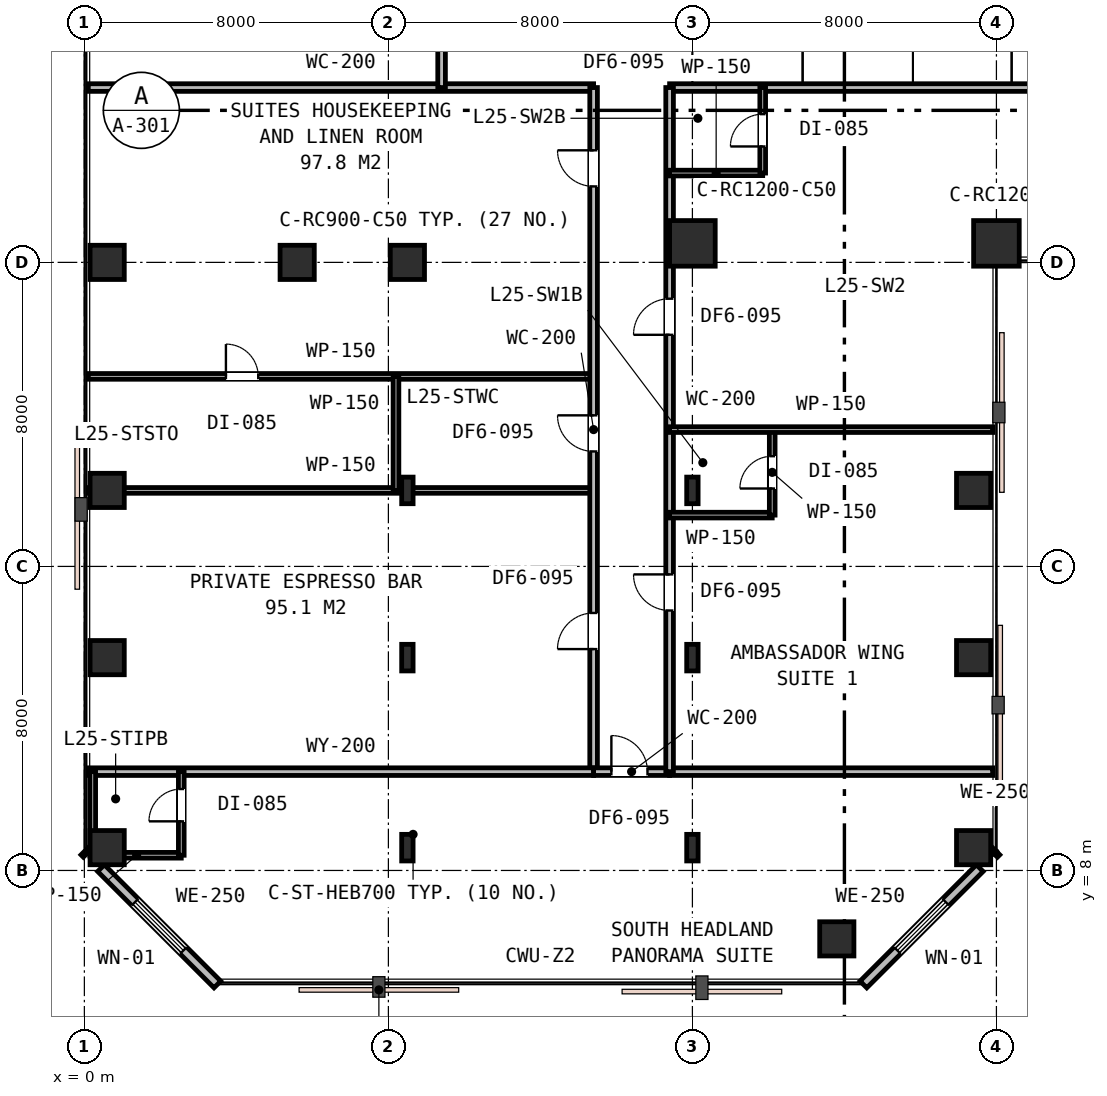
"""IFC4 building model, lengths in metres.
Left out: names, types, materials, properties, quantities, classifications, styles, units other than length and angle.
Written with IfcOpenShell. Run it as: python <this file> out.ifc"""

import sys

from ifc_helpers import new_model, si_unit, direction, frame, frame_2d, origin, origin_2d, place, context, subcontext, project, spatial, rectangle, i_section, extrude, element, fill, save


model = new_model("IFC4")
c1 = context("Model", 3, precision=1e-05, world=origin(), true_north=direction((0.0, 1.0)))
c2 = subcontext(c1, "Body", "Model", "MODEL_VIEW")
j1 = project(units=[si_unit("LENGTHUNIT", "METRE"), si_unit("PLANEANGLEUNIT", "RADIAN")], contexts=[c1])
p1 = place(None, origin())
s1 = spatial("IfcSite", under=j1, at=p1, CompositionType="ELEMENT")
p2 = place(p1, origin())
s2 = spatial("IfcBuilding", under=s1, at=p2, CompositionType="ELEMENT")
p3 = place(p2, frame((0.0, 0.0, 100.8)))
s3 = spatial("IfcBuildingStorey", under=s2, at=p3, CompositionType="ELEMENT", Elevation=100.8)
p4 = place(p3, frame((8.5, 24.0, 0.0), z_axis=(0.0, 0.0, 1.0), x_axis=(1.0, 0.0, 0.0)))
e1 = element("IfcColumn", 1, at=p4, inside=s3, PredefinedType="COLUMN", context=c2, shape_type="SweptSolid", body=[
    extrude(rectangle(XDim=0.9, YDim=0.9, at=origin_2d()), origin(), (0.0, 0.0, 1.0), 3.6),
])
for number, where, z_axis, x_axis in (
    (2, (16.0, 24.5, 0.0), (0.0, 0.0, 1.0), (1.0, 0.0, 0.0)),
    (3, (24.0, 24.5, 0.0), (0.0, 0.0, 1.0), (1.0, 0.0, 0.0)),
):
    element("IfcColumn", number, at=place(p3, frame(where, z_axis=z_axis, x_axis=x_axis)), inside=s3, PredefinedType="COLUMN", context=c2, shape_type="SweptSolid", body=[
        extrude(rectangle(XDim=1.2, YDim=1.2, at=origin_2d()), origin(), (0.0, 0.0, 1.0), 3.6),
    ])
for number, where, z_axis, x_axis in (
    (4, (5.6, 24.0, 0.0), (0.0, 0.0, 1.0), (1.0, 0.0, 0.0)),
    (5, (0.6, 24.0, 0.0), (0.0, 0.0, 1.0), (1.0, 0.0, 0.0)),
    (6, (0.6, 8.6, 0.0), (0.0, 0.0, 1.0), (1.0, 0.0, 0.0)),
    (7, (0.6, 13.6, 0.0), (0.0, 0.0, 1.0), (1.0, 0.0, 0.0)),
    (8, (0.6, 18.0, 0.0), (0.0, 0.0, 1.0), (1.0, 0.0, 0.0)),
    (9, (19.8, 6.2, 0.0), (0.0, 0.0, 1.0), (1.0, 0.0, 0.0)),
    (10, (23.4, 8.6, 0.0), (0.0, 0.0, 1.0), (1.0, 0.0, 0.0)),
    (11, (23.4, 13.6, 0.0), (0.0, 0.0, 1.0), (1.0, 0.0, 0.0)),
    (12, (23.4, 18.0, 0.0), (0.0, 0.0, 1.0), (1.0, 0.0, 0.0)),
):
    element("IfcColumn", number, at=place(p3, frame(where, z_axis=z_axis, x_axis=x_axis)), inside=s3, PredefinedType="COLUMN", context=c2, shape_type="SweptSolid", body=[
        extrude(rectangle(XDim=0.9, YDim=0.9, at=origin_2d()), origin(), (0.0, 0.0, 1.0), 3.6),
    ])
for number, where, z_axis, x_axis in (
    (13, (8.5, 8.6, 0.0), (0.0, 0.0, 1.0), (1.0, 0.0, 0.0)),
    (14, (16.0, 8.6, 0.0), (0.0, 0.0, 1.0), (1.0, 0.0, 0.0)),
    (15, (8.5, 13.6, 0.0), (0.0, 0.0, 1.0), (1.0, 0.0, 0.0)),
    (16, (16.0, 13.6, 0.0), (0.0, 0.0, 1.0), (1.0, 0.0, 0.0)),
    (17, (8.5, 18.0, 0.0), (0.0, 0.0, 1.0), (1.0, 0.0, 0.0)),
    (18, (16.0, 18.0, 0.0), (0.0, 0.0, 1.0), (1.0, 0.0, 0.0)),
):
    element("IfcColumn", number, at=place(p3, frame(where, z_axis=z_axis, x_axis=x_axis)), inside=s3, PredefinedType="COLUMN", context=c2, shape_type="SweptSolid", body=[
        extrude(i_section(OverallWidth=0.3, OverallDepth=0.7, WebThickness=0.017, FlangeThickness=0.032, FilletRadius=0.027, at=origin_2d()), origin(), (0.0, 0.0, 1.0), 3.6),
    ])
p5 = place(p3, frame((20.5, 5.0, 0.0), z_axis=(0.0, 0.0, 1.0), x_axis=(0.707106781187, 0.707106781187, 0.0)))
e19 = element("IfcWall", 19, at=p5, inside=s3, PredefinedType="STANDARD", context=c2, shape_type="SweptSolid", body=[
    extrude(rectangle(XDim=4.33, YDim=0.25, at=frame_2d((2.165, 0.0))), origin(), (0.0, 0.0, 1.0), 3.33),
])
p6 = place(p5, frame((1.265, 0.0, 0.75)))
e20 = element("IfcOpeningElement", 20, at=p6, cuts=e19, PredefinedType="OPENING", context=c2, shape_type="SweptSolid", body=[
    extrude(rectangle(XDim=1.8, YDim=1.85, at=frame_2d((0.9, 0.925))), frame((0.0, 0.135, 0.0), z_axis=(0.0, -1.0, 0.0), x_axis=(1.0, 0.0, 0.0)), (0.0, 0.0, 1.0), 0.27),
])
for number, where, z_axis, x_axis in (
    (21, (23.938, 8.438, 0.0), (0.0, 0.0, 1.0), (0.707, 0.707, 0.0)),
    (22, (0.0, 8.5, 0.0), (0.0, 0.0, 1.0), (0.707, -0.707, 0.0)),
):
    element("IfcWall", number, at=place(p3, frame(where, z_axis=z_axis, x_axis=x_axis)), inside=s3, PredefinedType="STANDARD", context=c2, shape_type="SweptSolid", body=[
        extrude(rectangle(XDim=0.087, YDim=0.25, at=frame_2d((0.044, 0.0))), origin(), (0.0, 0.0, 1.0), 3.33),
    ])
p7 = place(p3, frame((0.438, 8.062, 0.0), z_axis=(0.0, 0.0, 1.0), x_axis=(0.707106781187, -0.707106781187, 0.0)))
e23 = element("IfcWall", 23, at=p7, inside=s3, PredefinedType="STANDARD", context=c2, shape_type="SweptSolid", body=[
    extrude(rectangle(XDim=4.33, YDim=0.25, at=frame_2d((2.165, 0.0))), origin(), (0.0, 0.0, 1.0), 3.33),
])
p8 = place(p7, frame((1.265, 0.0, 0.75)))
e24 = element("IfcOpeningElement", 24, at=p8, cuts=e23, PredefinedType="OPENING", context=c2, shape_type="SweptSolid", body=[
    extrude(rectangle(XDim=1.8, YDim=1.85, at=frame_2d((0.9, 0.925))), frame((0.0, 0.135, 0.0), z_axis=(0.0, -1.0, 0.0), x_axis=(1.0, 0.0, 0.0)), (0.0, 0.0, 1.0), 0.27),
])
p9 = place(p3, frame((0.1, 28.6, 0.0), z_axis=(0.0, 0.0, 1.0), x_axis=(1.0, 0.0, 0.0)))
e25 = element("IfcWall", 25, at=p9, inside=s3, PredefinedType="PARTITIONING", context=c2, shape_type="SweptSolid", body=[
    extrude(rectangle(XDim=13.3, YDim=0.2, at=frame_2d((6.65, 0.0))), origin(), (0.0, 0.0, 1.0), 2.87),
])
p10 = place(p3, frame((15.4, 28.6, 0.0), z_axis=(0.0, 0.0, 1.0), x_axis=(1.0, 0.0, 0.0)))
e26 = element("IfcWall", 26, at=p10, inside=s3, PredefinedType="PARTITIONING", context=c2, shape_type="SweptSolid", body=[
    extrude(rectangle(XDim=28.8, YDim=0.2, at=frame_2d((14.4, 0.0))), origin(), (0.0, 0.0, 1.0), 2.87),
])
p11 = place(p10, frame((12.41, 0.0, 0.0)))
e27 = element("IfcOpeningElement", 27, at=p11, cuts=e26, PredefinedType="OPENING", context=c2, shape_type="SweptSolid", body=[
    extrude(rectangle(XDim=0.95, YDim=2.15, at=frame_2d((0.475, 1.075))), frame((0.0, 0.11, 0.0), z_axis=(0.0, -1.0, 0.0), x_axis=(1.0, 0.0, 0.0)), (0.0, 0.0, 1.0), 0.22),
])
p12 = place(p10, frame((22.68, 0.0, 0.0)))
e28 = element("IfcOpeningElement", 28, at=p12, cuts=e26, PredefinedType="OPENING", context=c2, shape_type="SweptSolid", body=[
    extrude(rectangle(XDim=0.95, YDim=2.15, at=frame_2d((0.475, 1.075))), frame((0.0, 0.11, 0.0), z_axis=(0.0, -1.0, 0.0), x_axis=(1.0, 0.0, 0.0)), (0.0, 0.0, 1.0), 0.22),
])
p13 = place(p3, frame((0.1, 18.0, 0.0), z_axis=(0.0, 0.0, 1.0), x_axis=(1.0, 0.0, 0.0)))
e29 = element("IfcWall", 29, at=p13, inside=s3, PredefinedType="PARTITIONING", context=c2, shape_type="SweptSolid", body=[
    extrude(rectangle(XDim=13.3, YDim=0.15, at=frame_2d((6.65, 0.0))), origin(), (0.0, 0.0, 1.0), 2.87),
])
p14 = place(p3, frame((0.1, 21.0, 0.0), z_axis=(0.0, 0.0, 1.0), x_axis=(1.0, 0.0, 0.0)))
e30 = element("IfcWall", 30, at=p14, inside=s3, PredefinedType="PARTITIONING", context=c2, shape_type="SweptSolid", body=[
    extrude(rectangle(XDim=13.3, YDim=0.15, at=frame_2d((6.65, 0.0))), origin(), (0.0, 0.0, 1.0), 2.87),
])
p15 = place(p14, frame((3.625, 0.0, 0.0)))
e31 = element("IfcOpeningElement", 31, at=p15, cuts=e30, PredefinedType="OPENING", context=c2, shape_type="SweptSolid", body=[
    extrude(rectangle(XDim=0.85, YDim=2.15, at=frame_2d((0.425, 1.075))), frame((0.0, 0.085, 0.0), z_axis=(0.0, -1.0, 0.0), x_axis=(1.0, 0.0, 0.0)), (0.0, 0.0, 1.0), 0.17),
])
p16 = place(p3, frame((8.2, 18.0, 0.0), z_axis=(0.0, 0.0, 1.0), x_axis=(0.0, 1.0, 0.0)))
e32 = element("IfcWall", 32, at=p16, inside=s3, PredefinedType="PARTITIONING", context=c2, shape_type="SweptSolid", body=[
    extrude(rectangle(XDim=3.0, YDim=0.15, at=frame_2d((1.5, 0.0))), origin(), (0.0, 0.0, 1.0), 2.87),
])
p17 = place(p3, frame((13.4, 10.6, 0.0), z_axis=(0.0, 0.0, 1.0), x_axis=(0.0, 1.0, 0.0)))
e33 = element("IfcWall", 33, at=p17, inside=s3, PredefinedType="PARTITIONING", context=c2, shape_type="SweptSolid", body=[
    extrude(rectangle(XDim=18.0, YDim=0.2, at=frame_2d((9.0, 0.0))), origin(), (0.0, 0.0, 1.0), 2.87),
])
p18 = place(p17, frame((8.425, 0.0, 0.0)))
e34 = element("IfcOpeningElement", 34, at=p18, cuts=e33, PredefinedType="OPENING", context=c2, shape_type="SweptSolid", body=[
    extrude(rectangle(XDim=0.95, YDim=2.15, at=frame_2d((0.475, 1.075))), frame((0.0, 0.11, 0.0), z_axis=(0.0, -1.0, 0.0), x_axis=(1.0, 0.0, 0.0)), (0.0, 0.0, 1.0), 0.22),
])
p19 = place(p17, frame((15.399, 0.0, 0.0)))
e35 = element("IfcOpeningElement", 35, at=p19, cuts=e33, PredefinedType="OPENING", context=c2, shape_type="SweptSolid", body=[
    extrude(rectangle(XDim=0.95, YDim=2.15, at=frame_2d((0.475, 1.075))), frame((0.0, 0.11, 0.0), z_axis=(0.0, -1.0, 0.0), x_axis=(1.0, 0.0, 0.0)), (0.0, 0.0, 1.0), 0.22),
])
p20 = place(p17, frame((3.225, 0.0, 0.0)))
e36 = element("IfcOpeningElement", 36, at=p20, cuts=e33, PredefinedType="OPENING", context=c2, shape_type="SweptSolid", body=[
    extrude(rectangle(XDim=0.95, YDim=2.15, at=frame_2d((0.475, 1.075))), frame((0.0, 0.11, 0.0), z_axis=(0.0, -1.0, 0.0), x_axis=(1.0, 0.0, 0.0)), (0.0, 0.0, 1.0), 0.22),
])
p21 = place(p3, frame((9.4, 28.6, 0.0), z_axis=(0.0, 0.0, 1.0), x_axis=(0.0, 1.0, 0.0)))
e37 = element("IfcWall", 37, at=p21, inside=s3, PredefinedType="PARTITIONING", context=c2, shape_type="SweptSolid", body=[
    extrude(rectangle(XDim=12.9, YDim=0.2, at=frame_2d((6.45, 0.0))), origin(), (0.0, 0.0, 1.0), 2.87),
])
p22 = place(p21, frame((3.825, 0.0, 0.0)))
e38 = element("IfcOpeningElement", 38, at=p22, cuts=e37, PredefinedType="OPENING", context=c2, shape_type="SweptSolid", body=[
    extrude(rectangle(XDim=0.95, YDim=2.15, at=frame_2d((0.475, 1.075))), frame((0.0, 0.11, 0.0), z_axis=(0.0, -1.0, 0.0), x_axis=(1.0, 0.0, 0.0)), (0.0, 0.0, 1.0), 0.22),
])
p23 = place(p21, frame((9.175, 0.0, 0.0)))
e39 = element("IfcOpeningElement", 39, at=p23, cuts=e37, PredefinedType="OPENING", context=c2, shape_type="SweptSolid", body=[
    extrude(rectangle(XDim=0.95, YDim=2.15, at=frame_2d((0.475, 1.075))), frame((0.0, 0.11, 0.0), z_axis=(0.0, -1.0, 0.0), x_axis=(1.0, 0.0, 0.0)), (0.0, 0.0, 1.0), 0.22),
])
p24 = place(p3, frame((0.1, 10.6, 0.0), z_axis=(0.0, 0.0, 1.0), x_axis=(1.0, 0.0, 0.0)))
e40 = element("IfcWall", 40, at=p24, inside=s3, PredefinedType="PARTITIONING", context=c2, shape_type="SweptSolid", body=[
    extrude(rectangle(XDim=13.3, YDim=0.2, at=frame_2d((6.65, 0.0))), origin(), (0.0, 0.0, 1.0), 2.87),
])
p25 = place(p3, frame((15.4, 10.6, 0.0), z_axis=(0.0, 0.0, 1.0), x_axis=(1.0, 0.0, 0.0)))
e41 = element("IfcWall", 41, at=p25, inside=s3, PredefinedType="PARTITIONING", context=c2, shape_type="SweptSolid", body=[
    extrude(rectangle(XDim=8.5, YDim=0.2, at=frame_2d((4.25, 0.0))), origin(), (0.0, 0.0, 1.0), 2.87),
])
p26 = place(p3, frame((13.4, 10.6, 0.0), z_axis=(0.0, 0.0, 1.0), x_axis=(1.0, 0.0, 0.0)))
e42 = element("IfcWall", 42, at=p26, inside=s3, PredefinedType="PARTITIONING", context=c2, shape_type="SweptSolid", body=[
    extrude(rectangle(XDim=2.0, YDim=0.2, at=frame_2d((1.0, 0.0))), origin(), (0.0, 0.0, 1.0), 3.01),
])
p27 = place(p26, frame((0.468, 0.0, 0.0)))
e43 = element("IfcOpeningElement", 43, at=p27, cuts=e42, PredefinedType="OPENING", context=c2, shape_type="SweptSolid", body=[
    extrude(rectangle(XDim=0.95, YDim=2.15, at=frame_2d((0.475, 1.075))), frame((0.0, 0.11, 0.0), z_axis=(0.0, -1.0, 0.0), x_axis=(1.0, 0.0, 0.0)), (0.0, 0.0, 1.0), 0.22),
])
p28 = place(p3, frame((0.2, 8.4, 0.0), z_axis=(0.0, 0.0, 1.0), x_axis=(1.0, 0.0, 0.0)))
e44 = element("IfcWall", 44, at=p28, inside=s3, PredefinedType="PARTITIONING", context=c2, shape_type="SweptSolid", body=[
    extrude(rectangle(XDim=2.35, YDim=0.15, at=frame_2d((1.175, 0.0))), origin(), (0.0, 0.0, 1.0), 2.87),
])
p29 = place(p3, frame((2.55, 8.4, 0.0), z_axis=(0.0, 0.0, 1.0), x_axis=(0.0, 1.0, 0.0)))
e45 = element("IfcWall", 45, at=p29, inside=s3, PredefinedType="PARTITIONING", context=c2, shape_type="SweptSolid", body=[
    extrude(rectangle(XDim=2.2, YDim=0.15, at=frame_2d((1.1, 0.0))), origin(), (0.0, 0.0, 1.0), 2.87),
])
p30 = place(p29, frame((0.892, 0.0, 0.0)))
e46 = element("IfcOpeningElement", 46, at=p30, cuts=e45, PredefinedType="OPENING", context=c2, shape_type="SweptSolid", body=[
    extrude(rectangle(XDim=0.85, YDim=2.15, at=frame_2d((0.425, 1.075))), frame((0.0, 0.085, 0.0), z_axis=(0.0, -1.0, 0.0), x_axis=(1.0, 0.0, 0.0)), (0.0, 0.0, 1.0), 0.17),
])
p31 = place(p3, frame((0.22, 8.38, 0.0), z_axis=(0.0, 0.0, 1.0), x_axis=(0.0, 1.0, 0.0)))
e47 = element("IfcWall", 47, at=p31, inside=s3, PredefinedType="PARTITIONING", context=c2, shape_type="SweptSolid", body=[
    extrude(rectangle(XDim=2.22, YDim=0.15, at=frame_2d((1.11, 0.0))), origin(), (0.0, 0.0, 1.0), 2.87),
])
p32 = place(p3, frame((15.4, 10.6, 0.0), z_axis=(0.0, 0.0, 1.0), x_axis=(0.0, 1.0, 0.0)))
e48 = element("IfcWall", 48, at=p32, inside=s3, PredefinedType="PARTITIONING", context=c2, shape_type="SweptSolid", body=[
    extrude(rectangle(XDim=18.0, YDim=0.2, at=frame_2d((9.0, 0.0))), origin(), (0.0, 0.0, 1.0), 2.87),
])
p33 = place(p32, frame((4.24, 0.0, 0.0)))
e49 = element("IfcOpeningElement", 49, at=p33, cuts=e48, PredefinedType="OPENING", context=c2, shape_type="SweptSolid", body=[
    extrude(rectangle(XDim=0.95, YDim=2.15, at=frame_2d((0.475, 1.075))), frame((0.0, 0.11, 0.0), z_axis=(0.0, -1.0, 0.0), x_axis=(1.0, 0.0, 0.0)), (0.0, 0.0, 1.0), 0.22),
])
p34 = place(p32, frame((11.494, 0.0, 0.0)))
e50 = element("IfcOpeningElement", 50, at=p34, cuts=e48, PredefinedType="OPENING", context=c2, shape_type="SweptSolid", body=[
    extrude(rectangle(XDim=0.95, YDim=2.15, at=frame_2d((0.475, 1.075))), frame((0.0, 0.11, 0.0), z_axis=(0.0, -1.0, 0.0), x_axis=(1.0, 0.0, 0.0)), (0.0, 0.0, 1.0), 0.22),
])
p35 = place(p3, frame((15.4, 17.35, 0.0), z_axis=(0.0, 0.0, 1.0), x_axis=(1.0, 0.0, 0.0)))
e51 = element("IfcWall", 51, at=p35, inside=s3, PredefinedType="PARTITIONING", context=c2, shape_type="SweptSolid", body=[
    extrude(rectangle(XDim=2.7, YDim=0.15, at=frame_2d((1.35, 0.0))), origin(), (0.0, 0.0, 1.0), 2.87),
])
p36 = place(p3, frame((18.1, 17.35, 0.0), z_axis=(0.0, 0.0, 1.0), x_axis=(0.0, 1.0, 0.0)))
e52 = element("IfcWall", 52, at=p36, inside=s3, PredefinedType="PARTITIONING", context=c2, shape_type="SweptSolid", body=[
    extrude(rectangle(XDim=2.25, YDim=0.15, at=frame_2d((1.125, 0.0))), origin(), (0.0, 0.0, 1.0), 2.87),
])
p37 = place(p36, frame((0.7, 0.0, 0.0)))
e53 = element("IfcOpeningElement", 53, at=p37, cuts=e52, PredefinedType="OPENING", context=c2, shape_type="SweptSolid", body=[
    extrude(rectangle(XDim=0.85, YDim=2.15, at=frame_2d((0.425, 1.075))), frame((0.0, 0.085, 0.0), z_axis=(0.0, -1.0, 0.0), x_axis=(1.0, 0.0, 0.0)), (0.0, 0.0, 1.0), 0.17),
])
p38 = place(p3, frame((15.4, 19.6, 0.0), z_axis=(0.0, 0.0, 1.0), x_axis=(1.0, 0.0, 0.0)))
e54 = element("IfcWall", 54, at=p38, inside=s3, PredefinedType="PARTITIONING", context=c2, shape_type="SweptSolid", body=[
    extrude(rectangle(XDim=8.5, YDim=0.15, at=frame_2d((4.25, 0.0))), origin(), (0.0, 0.0, 1.0), 2.87),
])
p39 = place(p3, frame((15.4, 26.35, 0.0), z_axis=(0.0, 0.0, 1.0), x_axis=(1.0, 0.0, 0.0)))
e55 = element("IfcWall", 55, at=p39, inside=s3, PredefinedType="PARTITIONING", context=c2, shape_type="SweptSolid", body=[
    extrude(rectangle(XDim=2.45, YDim=0.15, at=frame_2d((1.225, 0.0))), origin(), (0.0, 0.0, 1.0), 2.87),
])
p40 = place(p3, frame((17.85, 26.35, 0.0), z_axis=(0.0, 0.0, 1.0), x_axis=(0.0, 1.0, 0.0)))
e56 = element("IfcWall", 56, at=p40, inside=s3, PredefinedType="PARTITIONING", context=c2, shape_type="SweptSolid", body=[
    extrude(rectangle(XDim=2.25, YDim=0.15, at=frame_2d((1.125, 0.0))), origin(), (0.0, 0.0, 1.0), 3.33),
])
p41 = place(p40, frame((0.7, 0.0, 0.0)))
e57 = element("IfcOpeningElement", 57, at=p41, cuts=e56, PredefinedType="OPENING", context=c2, shape_type="SweptSolid", body=[
    extrude(rectangle(XDim=0.85, YDim=2.15, at=frame_2d((0.425, 1.075))), frame((0.0, 0.085, 0.0), z_axis=(0.0, -1.0, 0.0), x_axis=(1.0, 0.0, 0.0)), (0.0, 0.0, 1.0), 0.17),
])
p42 = place(p6, origin())
e58 = element("IfcWindow", 58, at=p42, inside=s3, PartitioningType="SINGLE_PANEL", PredefinedType="WINDOW", context=c2, shape_type="SweptSolid", body=[
    extrude(rectangle(XDim=1.8, YDim=1.85, at=frame_2d((0.9, 0.925))), frame((0.0, 0.03, 0.0), z_axis=(0.0, -1.0, 0.0), x_axis=(1.0, 0.0, 0.0)), (0.0, 0.0, 1.0), 0.06),
])
fill(e20, e58)
p43 = place(p8, origin())
e59 = element("IfcWindow", 59, at=p43, inside=s3, PartitioningType="SINGLE_PANEL", PredefinedType="WINDOW", context=c2, shape_type="SweptSolid", body=[
    extrude(rectangle(XDim=1.8, YDim=1.85, at=frame_2d((0.9, 0.925))), frame((0.0, 0.03, 0.0), z_axis=(0.0, -1.0, 0.0), x_axis=(1.0, 0.0, 0.0)), (0.0, 0.0, 1.0), 0.06),
])
fill(e24, e59)
p44 = place(p18, origin())
e60 = element("IfcDoor", 60, at=p44, inside=s3, OperationType="SINGLE_SWING_RIGHT", PredefinedType="DOOR", context=c2, shape_type="SweptSolid", body=[
    extrude(rectangle(XDim=0.95, YDim=2.15, at=frame_2d((0.475, 1.075))), frame((0.0, 0.025, 0.0), z_axis=(0.0, -1.0, 0.0), x_axis=(1.0, 0.0, 0.0)), (0.0, 0.0, 1.0), 0.05),
])
fill(e34, e60)
p45 = place(p15, origin())
e61 = element("IfcDoor", 61, at=p45, inside=s3, OperationType="SINGLE_SWING_LEFT", PredefinedType="DOOR", context=c2, shape_type="SweptSolid", body=[
    extrude(rectangle(XDim=0.85, YDim=2.15, at=frame_2d((0.425, 1.075))), frame((0.0, 0.025, 0.0), z_axis=(0.0, -1.0, 0.0), x_axis=(1.0, 0.0, 0.0)), (0.0, 0.0, 1.0), 0.05),
])
fill(e31, e61)
p46 = place(p19, origin())
e62 = element("IfcDoor", 62, at=p46, inside=s3, OperationType="SINGLE_SWING_RIGHT", PredefinedType="DOOR", context=c2, shape_type="SweptSolid", body=[
    extrude(rectangle(XDim=0.95, YDim=2.15, at=frame_2d((0.475, 1.075))), frame((0.0, 0.025, 0.0), z_axis=(0.0, -1.0, 0.0), x_axis=(1.0, 0.0, 0.0)), (0.0, 0.0, 1.0), 0.05),
])
fill(e35, e62)
p47 = place(p20, origin())
e63 = element("IfcDoor", 63, at=p47, inside=s3, OperationType="SINGLE_SWING_LEFT", PredefinedType="DOOR", context=c2, shape_type="SweptSolid", body=[
    extrude(rectangle(XDim=0.95, YDim=2.15, at=frame_2d((0.475, 1.075))), frame((0.0, 0.025, 0.0), z_axis=(0.0, -1.0, 0.0), x_axis=(1.0, 0.0, 0.0)), (0.0, 0.0, 1.0), 0.05),
])
fill(e36, e63)
p48 = place(p27, origin())
e64 = element("IfcDoor", 64, at=p48, inside=s3, OperationType="SINGLE_SWING_LEFT", PredefinedType="DOOR", context=c2, shape_type="SweptSolid", body=[
    extrude(rectangle(XDim=0.95, YDim=2.15, at=frame_2d((0.475, 1.075))), frame((0.0, 0.025, 0.0), z_axis=(0.0, -1.0, 0.0), x_axis=(1.0, 0.0, 0.0)), (0.0, 0.0, 1.0), 0.05),
])
fill(e43, e64)
p49 = place(p30, origin())
e65 = element("IfcDoor", 65, at=p49, inside=s3, OperationType="SINGLE_SWING_LEFT", PredefinedType="DOOR", context=c2, shape_type="SweptSolid", body=[
    extrude(rectangle(XDim=0.85, YDim=2.15, at=frame_2d((0.425, 1.075))), frame((0.0, 0.025, 0.0), z_axis=(0.0, -1.0, 0.0), x_axis=(1.0, 0.0, 0.0)), (0.0, 0.0, 1.0), 0.05),
])
fill(e46, e65)
p50 = place(p33, origin())
e66 = element("IfcDoor", 66, at=p50, inside=s3, OperationType="SINGLE_SWING_RIGHT", PredefinedType="DOOR", context=c2, shape_type="SweptSolid", body=[
    extrude(rectangle(XDim=0.95, YDim=2.15, at=frame_2d((0.475, 1.075))), frame((0.0, 0.025, 0.0), z_axis=(0.0, -1.0, 0.0), x_axis=(1.0, 0.0, 0.0)), (0.0, 0.0, 1.0), 0.05),
])
fill(e49, e66)
p51 = place(p37, origin())
e67 = element("IfcDoor", 67, at=p51, inside=s3, OperationType="SINGLE_SWING_LEFT", PredefinedType="DOOR", context=c2, shape_type="SweptSolid", body=[
    extrude(rectangle(XDim=0.85, YDim=2.15, at=frame_2d((0.425, 1.075))), frame((0.0, 0.025, 0.0), z_axis=(0.0, -1.0, 0.0), x_axis=(1.0, 0.0, 0.0)), (0.0, 0.0, 1.0), 0.05),
])
fill(e53, e67)
p52 = place(p34, origin())
e68 = element("IfcDoor", 68, at=p52, inside=s3, OperationType="SINGLE_SWING_LEFT", PredefinedType="DOOR", context=c2, shape_type="SweptSolid", body=[
    extrude(rectangle(XDim=0.95, YDim=2.15, at=frame_2d((0.475, 1.075))), frame((0.0, 0.025, 0.0), z_axis=(0.0, -1.0, 0.0), x_axis=(1.0, 0.0, 0.0)), (0.0, 0.0, 1.0), 0.05),
])
fill(e50, e68)
p53 = place(p41, origin())
e69 = element("IfcDoor", 69, at=p53, inside=s3, OperationType="SINGLE_SWING_LEFT", PredefinedType="DOOR", context=c2, shape_type="SweptSolid", body=[
    extrude(rectangle(XDim=0.85, YDim=2.15, at=frame_2d((0.425, 1.075))), frame((0.0, 0.025, 0.0), z_axis=(0.0, -1.0, 0.0), x_axis=(1.0, 0.0, 0.0)), (0.0, 0.0, 1.0), 0.05),
])
fill(e57, e69)
save(model, sys.argv[1])
